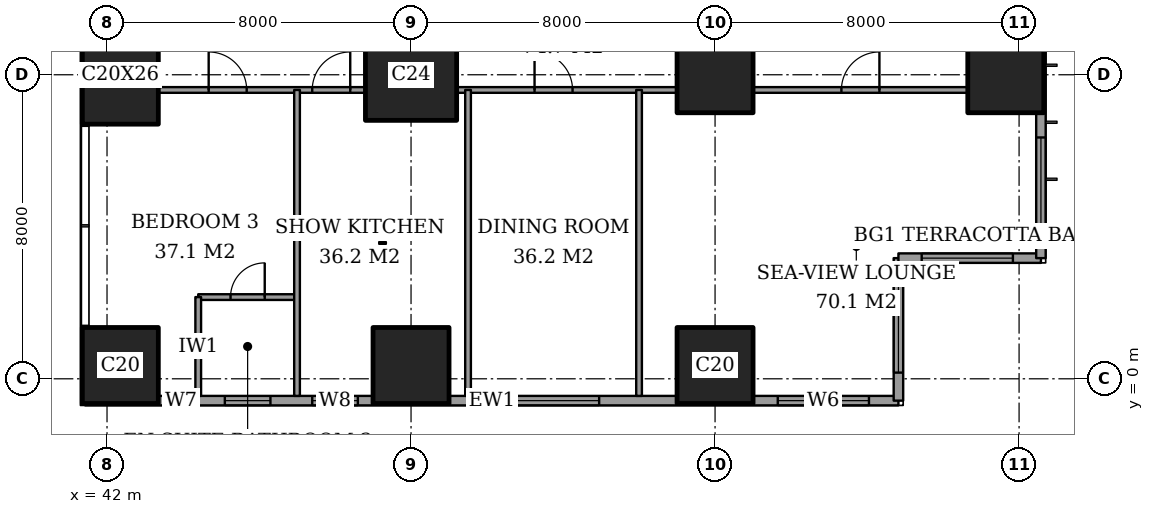
"""IFC4 building model, lengths in metres.
Left out: names, types, materials, properties, quantities, classifications, styles, units other than length and angle.
Written with IfcOpenShell. Run it as: python <this file> out.ifc"""

import sys

from ifc_helpers import new_model, si_unit, direction, frame, frame_2d, origin, origin_2d, place, context, subcontext, project, spatial, rectangle, extrude, element, fill, save


model = new_model("IFC4")
c1 = context("Model", 3, precision=1e-05, world=origin(), true_north=direction((0.0, 1.0)))
c2 = subcontext(c1, "Body", "Model", "MODEL_VIEW")
j1 = project(units=[si_unit("LENGTHUNIT", "METRE"), si_unit("PLANEANGLEUNIT", "RADIAN")], contexts=[c1])
p1 = place(None, origin())
s1 = spatial("IfcSite", under=j1, at=p1, CompositionType="ELEMENT")
p2 = place(p1, origin())
s2 = spatial("IfcBuilding", under=s1, at=p2, CompositionType="ELEMENT")
p3 = place(p2, frame((0.0, 0.0, 40.4)))
s3 = spatial("IfcBuildingStorey", under=s2, at=p3, CompositionType="ELEMENT", Elevation=40.4)
p4 = place(p3, frame((42.35, 0.35, 0.0), z_axis=(0.0, 0.0, 1.0), x_axis=(1.0, 0.0, 0.0)))
e1 = element("IfcColumn", 1, at=p4, inside=s3, PredefinedType="COLUMN", context=c2, shape_type="SweptSolid", body=[
    extrude(rectangle(XDim=2.0, YDim=2.0, at=origin_2d()), origin(), (0.0, 0.0, 1.0), 3.6),
])
p5 = place(p3, frame((42.35, 8.0, 0.0), z_axis=(0.0, 0.0, 1.0), x_axis=(1.0, 0.0, 0.0)))
e2 = element("IfcColumn", 2, at=p5, inside=s3, PredefinedType="COLUMN", context=c2, shape_type="SweptSolid", body=[
    extrude(rectangle(XDim=2.0, YDim=2.6, at=origin_2d()), origin(), (0.0, 0.0, 1.0), 3.6),
])
p6 = place(p3, frame((50.0, 0.35, 0.0), z_axis=(0.0, 0.0, 1.0), x_axis=(1.0, 0.0, 0.0)))
e3 = element("IfcColumn", 3, at=p6, inside=s3, PredefinedType="COLUMN", context=c2, shape_type="SweptSolid", body=[
    extrude(rectangle(XDim=2.0, YDim=2.0, at=origin_2d()), origin(), (0.0, 0.0, 1.0), 3.6),
])
p7 = place(p3, frame((50.0, 8.0, 0.0), z_axis=(0.0, 0.0, 1.0), x_axis=(1.0, 0.0, 0.0)))
e4 = element("IfcColumn", 4, at=p7, inside=s3, PredefinedType="COLUMN", context=c2, shape_type="SweptSolid", body=[
    extrude(rectangle(XDim=2.4, YDim=2.4, at=origin_2d()), origin(), (0.0, 0.0, 1.0), 3.6),
])
for number, where, z_axis, x_axis in (
    (5, (58.0, 0.35, 0.0), (0.0, 0.0, 1.0), (1.0, 0.0, 0.0)),
    (6, (58.0, 8.0, 0.0), (0.0, 0.0, 1.0), (1.0, 0.0, 0.0)),
    (7, (65.65, 8.0, 0.0), (0.0, 0.0, 1.0), (1.0, 0.0, 0.0)),
):
    element("IfcColumn", number, at=place(p3, frame(where, z_axis=z_axis, x_axis=x_axis)), inside=s3, PredefinedType="COLUMN", context=c2, shape_type="SweptSolid", body=[
        extrude(rectangle(XDim=2.0, YDim=2.0, at=origin_2d()), origin(), (0.0, 0.0, 1.0), 3.6),
    ])
p8 = place(p3, frame((41.425, -0.575, 0.0), z_axis=(0.0, 0.0, 1.0), x_axis=(1.0, 0.0, 0.0)))
e8 = element("IfcWall", 8, at=p8, inside=s3, PredefinedType="SOLIDWALL", context=c2, shape_type="SweptSolid", body=[
    extrude(rectangle(XDim=21.4, YDim=0.25, at=frame_2d((10.7, 0.0))), origin(), (0.0, 0.0, 1.0), 3.6),
])
p9 = place(p8, frame((2.225, 0.0, 0.6)))
e9 = element("IfcOpeningElement", 9, at=p9, cuts=e8, PredefinedType="OPENING", context=c2, shape_type="SweptSolid", body=[
    extrude(rectangle(XDim=0.6, YDim=2.0, at=frame_2d((0.3, 1.0))), frame((0.0, 0.135, 0.0), z_axis=(0.0, -1.0, 0.0), x_axis=(1.0, 0.0, 0.0)), (0.0, 0.0, 1.0), 0.27),
])
p10 = place(p8, frame((3.675, 0.0, 0.6)))
e10 = element("IfcOpeningElement", 10, at=p10, cuts=e8, PredefinedType="OPENING", context=c2, shape_type="SweptSolid", body=[
    extrude(rectangle(XDim=1.2, YDim=2.0, at=frame_2d((0.6, 1.0))), frame((0.0, 0.135, 0.0), z_axis=(0.0, -1.0, 0.0), x_axis=(1.0, 0.0, 0.0)), (0.0, 0.0, 1.0), 0.27),
])
p11 = place(p8, frame((5.975, 0.0, 0.6)))
e11 = element("IfcOpeningElement", 11, at=p11, cuts=e8, PredefinedType="OPENING", context=c2, shape_type="SweptSolid", body=[
    extrude(rectangle(XDim=1.2, YDim=2.0, at=frame_2d((0.6, 1.0))), frame((0.0, 0.135, 0.0), z_axis=(0.0, -1.0, 0.0), x_axis=(1.0, 0.0, 0.0)), (0.0, 0.0, 1.0), 0.27),
])
p12 = place(p8, frame((11.125, 0.0, 0.6)))
e12 = element("IfcOpeningElement", 12, at=p12, cuts=e8, PredefinedType="OPENING", context=c2, shape_type="SweptSolid", body=[
    extrude(rectangle(XDim=2.4, YDim=2.0, at=frame_2d((1.2, 1.0))), frame((0.0, 0.135, 0.0), z_axis=(0.0, -1.0, 0.0), x_axis=(1.0, 0.0, 0.0)), (0.0, 0.0, 1.0), 0.27),
])
p13 = place(p8, frame((18.225, 0.0, 0.6)))
e13 = element("IfcOpeningElement", 13, at=p13, cuts=e8, PredefinedType="OPENING", context=c2, shape_type="SweptSolid", body=[
    extrude(rectangle(XDim=2.4, YDim=2.0, at=frame_2d((1.2, 1.0))), frame((0.0, 0.135, 0.0), z_axis=(0.0, -1.0, 0.0), x_axis=(1.0, 0.0, 0.0)), (0.0, 0.0, 1.0), 0.27),
])
p14 = place(p3, frame((62.825, -0.575, 0.0), z_axis=(0.0, 0.0, 1.0), x_axis=(0.0, 1.0, 0.0)))
e14 = element("IfcWall", 14, at=p14, inside=s3, PredefinedType="SOLIDWALL", context=c2, shape_type="SweptSolid", body=[
    extrude(rectangle(XDim=3.75, YDim=0.25, at=frame_2d((1.875, 0.0))), origin(), (0.0, 0.0, 1.0), 3.6),
])
p15 = place(p14, frame((0.738, 0.0, 0.6)))
e15 = element("IfcOpeningElement", 15, at=p15, cuts=e14, PredefinedType="OPENING", context=c2, shape_type="SweptSolid", body=[
    extrude(rectangle(XDim=2.4, YDim=2.0, at=frame_2d((1.2, 1.0))), frame((0.0, 0.135, 0.0), z_axis=(0.0, -1.0, 0.0), x_axis=(1.0, 0.0, 0.0)), (0.0, 0.0, 1.0), 0.27),
])
p16 = place(p3, frame((62.825, 3.175, 0.0), z_axis=(0.0, 0.0, 1.0), x_axis=(1.0, 0.0, 0.0)))
e16 = element("IfcWall", 16, at=p16, inside=s3, PredefinedType="SOLIDWALL", context=c2, shape_type="SweptSolid", body=[
    extrude(rectangle(XDim=3.75, YDim=0.25, at=frame_2d((1.875, 0.0))), origin(), (0.0, 0.0, 1.0), 3.6),
])
p17 = place(p16, frame((0.613, 0.0, 0.6)))
e17 = element("IfcOpeningElement", 17, at=p17, cuts=e16, PredefinedType="OPENING", context=c2, shape_type="SweptSolid", body=[
    extrude(rectangle(XDim=2.4, YDim=2.0, at=frame_2d((1.2, 1.0))), frame((0.0, 0.135, 0.0), z_axis=(0.0, -1.0, 0.0), x_axis=(1.0, 0.0, 0.0)), (0.0, 0.0, 1.0), 0.27),
])
p18 = place(p3, frame((66.575, 3.175, 0.0), z_axis=(0.0, 0.0, 1.0), x_axis=(0.0, 1.0, 0.0)))
e18 = element("IfcWall", 18, at=p18, inside=s3, PredefinedType="SOLIDWALL", context=c2, shape_type="SweptSolid", body=[
    extrude(rectangle(XDim=41.65, YDim=0.25, at=frame_2d((20.825, 0.0))), origin(), (0.0, 0.0, 1.0), 3.6),
])
p19 = place(p18, frame((0.775, 0.0, 0.6)))
e19 = element("IfcOpeningElement", 19, at=p19, cuts=e18, PredefinedType="OPENING", context=c2, shape_type="SweptSolid", body=[
    extrude(rectangle(XDim=2.4, YDim=2.0, at=frame_2d((1.2, 1.0))), frame((0.0, 0.135, 0.0), z_axis=(0.0, -1.0, 0.0), x_axis=(1.0, 0.0, 0.0)), (0.0, 0.0, 1.0), 0.27),
])
p20 = place(p18, frame((6.1, 0.0, 0.6)))
e20 = element("IfcOpeningElement", 20, at=p20, cuts=e18, PredefinedType="OPENING", context=c2, shape_type="SweptSolid", body=[
    extrude(rectangle(XDim=1.2, YDim=2.0, at=frame_2d((0.6, 1.0))), frame((0.0, 0.135, 0.0), z_axis=(0.0, -1.0, 0.0), x_axis=(1.0, 0.0, 0.0)), (0.0, 0.0, 1.0), 0.27),
])
p21 = place(p18, frame((8.275, 0.0, 0.6)))
e21 = element("IfcOpeningElement", 21, at=p21, cuts=e18, PredefinedType="OPENING", context=c2, shape_type="SweptSolid", body=[
    extrude(rectangle(XDim=2.4, YDim=2.0, at=frame_2d((1.2, 1.0))), frame((0.0, 0.135, 0.0), z_axis=(0.0, -1.0, 0.0), x_axis=(1.0, 0.0, 0.0)), (0.0, 0.0, 1.0), 0.27),
])
p22 = place(p18, frame((15.775, 0.0, 0.6)))
e22 = element("IfcOpeningElement", 22, at=p22, cuts=e18, PredefinedType="OPENING", context=c2, shape_type="SweptSolid", body=[
    extrude(rectangle(XDim=2.4, YDim=2.0, at=frame_2d((1.2, 1.0))), frame((0.0, 0.135, 0.0), z_axis=(0.0, -1.0, 0.0), x_axis=(1.0, 0.0, 0.0)), (0.0, 0.0, 1.0), 0.27),
])
p23 = place(p18, frame((23.475, 0.0, 0.6)))
e23 = element("IfcOpeningElement", 23, at=p23, cuts=e18, PredefinedType="OPENING", context=c2, shape_type="SweptSolid", body=[
    extrude(rectangle(XDim=2.4, YDim=2.0, at=frame_2d((1.2, 1.0))), frame((0.0, 0.135, 0.0), z_axis=(0.0, -1.0, 0.0), x_axis=(1.0, 0.0, 0.0)), (0.0, 0.0, 1.0), 0.27),
])
p24 = place(p18, frame((30.975, 0.0, 0.6)))
e24 = element("IfcOpeningElement", 24, at=p24, cuts=e18, PredefinedType="OPENING", context=c2, shape_type="SweptSolid", body=[
    extrude(rectangle(XDim=2.4, YDim=2.0, at=frame_2d((1.2, 1.0))), frame((0.0, 0.135, 0.0), z_axis=(0.0, -1.0, 0.0), x_axis=(1.0, 0.0, 0.0)), (0.0, 0.0, 1.0), 0.27),
])
p25 = place(p18, frame((34.5, 0.0, 0.6)))
e25 = element("IfcOpeningElement", 25, at=p25, cuts=e18, PredefinedType="OPENING", context=c2, shape_type="SweptSolid", body=[
    extrude(rectangle(XDim=1.2, YDim=2.0, at=frame_2d((0.6, 1.0))), frame((0.0, 0.135, 0.0), z_axis=(0.0, -1.0, 0.0), x_axis=(1.0, 0.0, 0.0)), (0.0, 0.0, 1.0), 0.27),
])
p26 = place(p18, frame((38.475, 0.0, 0.6)))
e26 = element("IfcOpeningElement", 26, at=p26, cuts=e18, PredefinedType="OPENING", context=c2, shape_type="SweptSolid", body=[
    extrude(rectangle(XDim=2.4, YDim=2.0, at=frame_2d((1.2, 1.0))), frame((0.0, 0.135, 0.0), z_axis=(0.0, -1.0, 0.0), x_axis=(1.0, 0.0, 0.0)), (0.0, 0.0, 1.0), 0.27),
])
p27 = place(p3, frame((44.4, 2.15, 0.0), z_axis=(0.0, 0.0, 1.0), x_axis=(1.0, 0.0, 0.0)))
e27 = element("IfcWall", 27, at=p27, inside=s3, PredefinedType="PARTITIONING", context=c2, shape_type="SweptSolid", body=[
    extrude(rectangle(XDim=2.6, YDim=0.15, at=frame_2d((1.3, 0.0))), origin(), (0.0, 0.0, 1.0), 3.35),
])
p28 = place(p27, frame((0.85, 0.0, 0.0)))
e28 = element("IfcOpeningElement", 28, at=p28, cuts=e27, PredefinedType="OPENING", context=c2, shape_type="SweptSolid", body=[
    extrude(rectangle(XDim=0.9, YDim=2.1, at=frame_2d((0.45, 1.05))), frame((0.0, 0.085, 0.0), z_axis=(0.0, -1.0, 0.0), x_axis=(1.0, 0.0, 0.0)), (0.0, 0.0, 1.0), 0.17),
])
p29 = place(p3, frame((43.35, 7.6, 0.0), z_axis=(0.0, 0.0, 1.0), x_axis=(1.0, 0.0, 0.0)))
e29 = element("IfcWall", 29, at=p29, inside=s3, PredefinedType="PARTITIONING", context=c2, shape_type="SweptSolid", body=[
    extrude(rectangle(XDim=5.45, YDim=0.15, at=frame_2d((2.725, 0.0))), origin(), (0.0, 0.0, 1.0), 3.35),
])
p30 = place(p29, frame((4.05, 0.0, 0.0)))
e30 = element("IfcOpeningElement", 30, at=p30, cuts=e29, PredefinedType="OPENING", context=c2, shape_type="SweptSolid", body=[
    extrude(rectangle(XDim=1.0, YDim=2.1, at=frame_2d((0.5, 1.05))), frame((0.0, 0.085, 0.0), z_axis=(0.0, -1.0, 0.0), x_axis=(1.0, 0.0, 0.0)), (0.0, 0.0, 1.0), 0.17),
])
p31 = place(p29, frame((1.325, 0.0, 0.0)))
e31 = element("IfcOpeningElement", 31, at=p31, cuts=e29, PredefinedType="OPENING", context=c2, shape_type="SweptSolid", body=[
    extrude(rectangle(XDim=1.0, YDim=2.1, at=frame_2d((0.5, 1.05))), frame((0.0, 0.085, 0.0), z_axis=(0.0, -1.0, 0.0), x_axis=(1.0, 0.0, 0.0)), (0.0, 0.0, 1.0), 0.17),
])
p32 = place(p3, frame((51.2, 7.6, 0.0), z_axis=(0.0, 0.0, 1.0), x_axis=(1.0, 0.0, 0.0)))
e32 = element("IfcWall", 32, at=p32, inside=s3, PredefinedType="PARTITIONING", context=c2, shape_type="SweptSolid", body=[
    extrude(rectangle(XDim=5.8, YDim=0.15, at=frame_2d((2.9, 0.0))), origin(), (0.0, 0.0, 1.0), 3.35),
])
p33 = place(p32, frame((2.05, 0.0, 0.0)))
e33 = element("IfcOpeningElement", 33, at=p33, cuts=e32, PredefinedType="OPENING", context=c2, shape_type="SweptSolid", body=[
    extrude(rectangle(XDim=1.0, YDim=2.1, at=frame_2d((0.5, 1.05))), frame((0.0, 0.085, 0.0), z_axis=(0.0, -1.0, 0.0), x_axis=(1.0, 0.0, 0.0)), (0.0, 0.0, 1.0), 0.17),
])
p34 = place(p3, frame((59.0, 7.6, 0.0), z_axis=(0.0, 0.0, 1.0), x_axis=(1.0, 0.0, 0.0)))
e34 = element("IfcWall", 34, at=p34, inside=s3, PredefinedType="PARTITIONING", context=c2, shape_type="SweptSolid", body=[
    extrude(rectangle(XDim=5.65, YDim=0.15, at=frame_2d((2.825, 0.0))), origin(), (0.0, 0.0, 1.0), 3.35),
])
p35 = place(p34, frame((2.325, 0.0, 0.0)))
e35 = element("IfcOpeningElement", 35, at=p35, cuts=e34, PredefinedType="OPENING", context=c2, shape_type="SweptSolid", body=[
    extrude(rectangle(XDim=1.0, YDim=2.1, at=frame_2d((0.5, 1.05))), frame((0.0, 0.085, 0.0), z_axis=(0.0, -1.0, 0.0), x_axis=(1.0, 0.0, 0.0)), (0.0, 0.0, 1.0), 0.17),
])
p36 = place(p3, frame((44.4, -0.45, 0.0), z_axis=(0.0, 0.0, 1.0), x_axis=(0.0, 1.0, 0.0)))
e36 = element("IfcWall", 36, at=p36, inside=s3, PredefinedType="PARTITIONING", context=c2, shape_type="SweptSolid", body=[
    extrude(rectangle(XDim=2.6, YDim=0.15, at=frame_2d((1.3, 0.0))), origin(), (0.0, 0.0, 1.0), 3.35),
])
for number, where, z_axis, x_axis in (
    (37, (47.0, -0.45, 0.0), (0.0, 0.0, 1.0), (0.0, 1.0, 0.0)),
    (38, (51.5, -0.45, 0.0), (0.0, 0.0, 1.0), (0.0, 1.0, 0.0)),
    (39, (56.0, -0.45, 0.0), (0.0, 0.0, 1.0), (0.0, 1.0, 0.0)),
):
    element("IfcWall", number, at=place(p3, frame(where, z_axis=z_axis, x_axis=x_axis)), inside=s3, PredefinedType="PARTITIONING", context=c2, shape_type="SweptSolid", body=[
        extrude(rectangle(XDim=8.05, YDim=0.15, at=frame_2d((4.025, 0.0))), origin(), (0.0, 0.0, 1.0), 3.35),
    ])
p37 = place(p9, origin())
e40 = element("IfcWindow", 40, at=p37, inside=s3, PartitioningType="SINGLE_PANEL", PredefinedType="WINDOW", context=c2, shape_type="SweptSolid", body=[
    extrude(rectangle(XDim=0.6, YDim=2.0, at=frame_2d((0.3, 1.0))), frame((0.0, 0.03, 0.0), z_axis=(0.0, -1.0, 0.0), x_axis=(1.0, 0.0, 0.0)), (0.0, 0.0, 1.0), 0.06),
])
fill(e9, e40)
p38 = place(p10, origin())
e41 = element("IfcWindow", 41, at=p38, inside=s3, PartitioningType="SINGLE_PANEL", PredefinedType="WINDOW", context=c2, shape_type="SweptSolid", body=[
    extrude(rectangle(XDim=1.2, YDim=2.0, at=frame_2d((0.6, 1.0))), frame((0.0, 0.03, 0.0), z_axis=(0.0, -1.0, 0.0), x_axis=(1.0, 0.0, 0.0)), (0.0, 0.0, 1.0), 0.06),
])
fill(e10, e41)
p39 = place(p11, origin())
e42 = element("IfcWindow", 42, at=p39, inside=s3, PartitioningType="SINGLE_PANEL", PredefinedType="WINDOW", context=c2, shape_type="SweptSolid", body=[
    extrude(rectangle(XDim=1.2, YDim=2.0, at=frame_2d((0.6, 1.0))), frame((0.0, 0.03, 0.0), z_axis=(0.0, -1.0, 0.0), x_axis=(1.0, 0.0, 0.0)), (0.0, 0.0, 1.0), 0.06),
])
fill(e11, e42)
p40 = place(p12, origin())
e43 = element("IfcWindow", 43, at=p40, inside=s3, PartitioningType="SINGLE_PANEL", PredefinedType="WINDOW", context=c2, shape_type="SweptSolid", body=[
    extrude(rectangle(XDim=2.4, YDim=2.0, at=frame_2d((1.2, 1.0))), frame((0.0, 0.03, 0.0), z_axis=(0.0, -1.0, 0.0), x_axis=(1.0, 0.0, 0.0)), (0.0, 0.0, 1.0), 0.06),
])
fill(e12, e43)
p41 = place(p13, origin())
e44 = element("IfcWindow", 44, at=p41, inside=s3, PartitioningType="SINGLE_PANEL", PredefinedType="WINDOW", context=c2, shape_type="SweptSolid", body=[
    extrude(rectangle(XDim=2.4, YDim=2.0, at=frame_2d((1.2, 1.0))), frame((0.0, 0.03, 0.0), z_axis=(0.0, -1.0, 0.0), x_axis=(1.0, 0.0, 0.0)), (0.0, 0.0, 1.0), 0.06),
])
fill(e13, e44)
p42 = place(p15, origin())
e45 = element("IfcWindow", 45, at=p42, inside=s3, PartitioningType="SINGLE_PANEL", PredefinedType="WINDOW", context=c2, shape_type="SweptSolid", body=[
    extrude(rectangle(XDim=2.4, YDim=2.0, at=frame_2d((1.2, 1.0))), frame((0.0, 0.03, 0.0), z_axis=(0.0, -1.0, 0.0), x_axis=(1.0, 0.0, 0.0)), (0.0, 0.0, 1.0), 0.06),
])
fill(e15, e45)
p43 = place(p17, origin())
e46 = element("IfcWindow", 46, at=p43, inside=s3, PartitioningType="SINGLE_PANEL", PredefinedType="WINDOW", context=c2, shape_type="SweptSolid", body=[
    extrude(rectangle(XDim=2.4, YDim=2.0, at=frame_2d((1.2, 1.0))), frame((0.0, 0.03, 0.0), z_axis=(0.0, -1.0, 0.0), x_axis=(1.0, 0.0, 0.0)), (0.0, 0.0, 1.0), 0.06),
])
fill(e17, e46)
p44 = place(p19, origin())
e47 = element("IfcWindow", 47, at=p44, inside=s3, PartitioningType="SINGLE_PANEL", PredefinedType="WINDOW", context=c2, shape_type="SweptSolid", body=[
    extrude(rectangle(XDim=2.4, YDim=2.0, at=frame_2d((1.2, 1.0))), frame((0.0, 0.03, 0.0), z_axis=(0.0, -1.0, 0.0), x_axis=(1.0, 0.0, 0.0)), (0.0, 0.0, 1.0), 0.06),
])
fill(e19, e47)
p45 = place(p35, origin())
e48 = element("IfcDoor", 48, at=p45, inside=s3, OperationType="SINGLE_SWING_LEFT", PredefinedType="DOOR", context=c2, shape_type="SweptSolid", body=[
    extrude(rectangle(XDim=1.0, YDim=2.1, at=frame_2d((0.5, 1.05))), frame((0.0, 0.025, 0.0), z_axis=(0.0, -1.0, 0.0), x_axis=(1.0, 0.0, 0.0)), (0.0, 0.0, 1.0), 0.05),
])
fill(e35, e48)
p46 = place(p33, origin())
e49 = element("IfcDoor", 49, at=p46, inside=s3, OperationType="SINGLE_SWING_RIGHT", PredefinedType="DOOR", context=c2, shape_type="SweptSolid", body=[
    extrude(rectangle(XDim=1.0, YDim=2.1, at=frame_2d((0.5, 1.05))), frame((0.0, 0.025, 0.0), z_axis=(0.0, -1.0, 0.0), x_axis=(1.0, 0.0, 0.0)), (0.0, 0.0, 1.0), 0.05),
])
fill(e33, e49)
p47 = place(p30, origin())
e50 = element("IfcDoor", 50, at=p47, inside=s3, OperationType="SINGLE_SWING_LEFT", PredefinedType="DOOR", context=c2, shape_type="SweptSolid", body=[
    extrude(rectangle(XDim=1.0, YDim=2.1, at=frame_2d((0.5, 1.05))), frame((0.0, 0.025, 0.0), z_axis=(0.0, -1.0, 0.0), x_axis=(1.0, 0.0, 0.0)), (0.0, 0.0, 1.0), 0.05),
])
fill(e30, e50)
p48 = place(p28, origin())
e51 = element("IfcDoor", 51, at=p48, inside=s3, OperationType="SINGLE_SWING_LEFT", PredefinedType="DOOR", context=c2, shape_type="SweptSolid", body=[
    extrude(rectangle(XDim=0.9, YDim=2.1, at=frame_2d((0.45, 1.05))), frame((0.0, 0.025, 0.0), z_axis=(0.0, -1.0, 0.0), x_axis=(1.0, 0.0, 0.0)), (0.0, 0.0, 1.0), 0.05),
])
fill(e28, e51)
p49 = place(p31, origin())
e52 = element("IfcDoor", 52, at=p49, inside=s3, OperationType="SINGLE_SWING_RIGHT", PredefinedType="DOOR", context=c2, shape_type="SweptSolid", body=[
    extrude(rectangle(XDim=1.0, YDim=2.1, at=frame_2d((0.5, 1.05))), frame((0.0, 0.025, 0.0), z_axis=(0.0, -1.0, 0.0), x_axis=(1.0, 0.0, 0.0)), (0.0, 0.0, 1.0), 0.05),
])
fill(e31, e52)
save(model, sys.argv[1])
